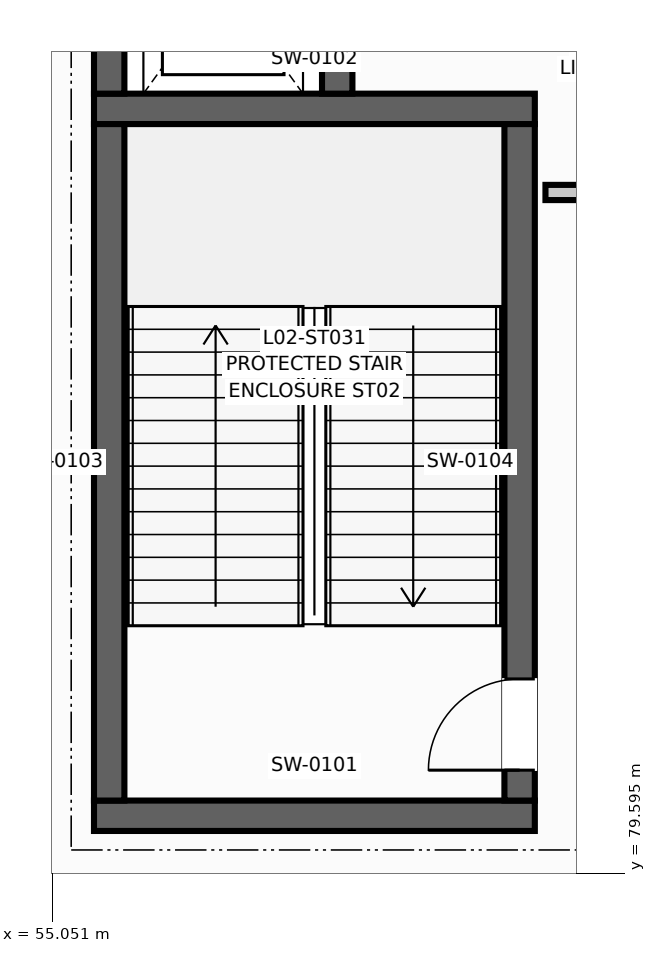
"""IFC4 building model, lengths in metres.
Left out: names, types, materials, properties, quantities, classifications, styles, units other than length and angle.
Written with IfcOpenShell. Run it as: python <this file> out.ifc"""

import sys

from ifc_helpers import new_model, si_unit, direction, frame, frame_2d, origin, place, context, subcontext, project, spatial, rectangle, extrude, element, fill, save


model = new_model("IFC4")
c1 = context("Model", 3, precision=1e-05, world=origin(), true_north=direction((0.0, 1.0)))
c2 = subcontext(c1, "Body", "Model", "MODEL_VIEW")
j1 = project(units=[si_unit("LENGTHUNIT", "METRE"), si_unit("PLANEANGLEUNIT", "RADIAN")], contexts=[c1])
p1 = place(None, origin())
s1 = spatial("IfcSite", under=j1, at=p1, CompositionType="ELEMENT")
p2 = place(p1, origin())
s2 = spatial("IfcBuilding", under=s1, at=p2, CompositionType="ELEMENT")
p3 = place(p2, frame((0.0, 0.0, 9.0)))
s3 = spatial("IfcBuildingStorey", under=s2, at=p3, CompositionType="ELEMENT", Elevation=9.0)
for number, where, z_axis, x_axis in (
    (1, (55.6, 80.35, 0.0), (0.0, 0.0, 1.0), (1.0, 0.0, 0.0)),
    (2, (55.6, 89.65, 0.0), (0.0, 0.0, 1.0), (1.0, 0.0, 0.0)),
):
    element("IfcWall", number, at=place(p3, frame(where, z_axis=z_axis, x_axis=x_axis)), inside=s3, PredefinedType="SHEAR", context=c2, shape_type="SweptSolid", body=[
        extrude(rectangle(XDim=5.8, YDim=0.4, at=frame_2d((2.9, 0.0))), origin(), (0.0, 0.0, 1.0), 4.25),
    ])
p4 = place(p3, frame((55.8, 80.55, 0.0), z_axis=(0.0, 0.0, 1.0), x_axis=(0.0, 1.0, 0.0)))
e3 = element("IfcWall", 3, at=p4, inside=s3, PredefinedType="SHEAR", context=c2, shape_type="SweptSolid", body=[
    extrude(rectangle(XDim=8.9, YDim=0.4, at=frame_2d((4.45, 0.0))), origin(), (0.0, 0.0, 1.0), 4.25),
])
p5 = place(p3, frame((61.2, 80.55, 0.0), z_axis=(0.0, 0.0, 1.0), x_axis=(0.0, 1.0, 0.0)))
e4 = element("IfcWall", 4, at=p5, inside=s3, PredefinedType="SHEAR", context=c2, shape_type="SweptSolid", body=[
    extrude(rectangle(XDim=8.9, YDim=0.4, at=frame_2d((4.45, 0.0))), origin(), (0.0, 0.0, 1.0), 4.25),
])
p6 = place(p5, frame((0.4, 0.0, 0.0)))
e5 = element("IfcOpeningElement", 5, at=p6, cuts=e4, PredefinedType="OPENING", context=c2, shape_type="SweptSolid", body=[
    extrude(rectangle(XDim=1.2, YDim=2.2, at=frame_2d((0.6, 1.1))), frame((0.0, 0.21, 0.0), z_axis=(0.0, -1.0, 0.0), x_axis=(1.0, 0.0, 0.0)), (0.0, 0.0, 1.0), 0.42),
])
p7 = place(p3, frame((55.8, 89.85, 0.0), z_axis=(0.0, 0.0, 1.0), x_axis=(0.0, 1.0, 0.0)))
e6 = element("IfcWall", 6, at=p7, inside=s3, PredefinedType="SHEAR", context=c2, shape_type="SweptSolid", body=[
    extrude(rectangle(XDim=2.9, YDim=0.4, at=frame_2d((1.45, 0.0))), origin(), (0.0, 0.0, 1.0), 4.25),
])
p8 = place(p3, frame((58.8, 89.85, 0.0), z_axis=(0.0, 0.0, 1.0), x_axis=(0.0, 1.0, 0.0)))
e7 = element("IfcWall", 7, at=p8, inside=s3, PredefinedType="SHEAR", context=c2, shape_type="SweptSolid", body=[
    extrude(rectangle(XDim=2.9, YDim=0.4, at=frame_2d((1.45, 0.0))), origin(), (0.0, 0.0, 1.0), 4.25),
])
p9 = place(p8, frame((0.9, 0.0, 0.0)))
e8 = element("IfcOpeningElement", 8, at=p9, cuts=e7, PredefinedType="OPENING", context=c2, shape_type="SweptSolid", body=[
    extrude(rectangle(XDim=1.1, YDim=2.2, at=frame_2d((0.55, 1.1))), frame((0.0, 0.21, 0.0), z_axis=(0.0, -1.0, 0.0), x_axis=(1.0, 0.0, 0.0)), (0.0, 0.0, 1.0), 0.42),
])
p10 = place(p3, frame((61.54, 88.55, 0.0), z_axis=(0.0, 0.0, 1.0), x_axis=(1.0, 0.0, 0.0)))
e9 = element("IfcWall", 9, at=p10, inside=s3, PredefinedType="PARTITIONING", context=c2, shape_type="SweptSolid", body=[
    extrude(rectangle(XDim=4.18, YDim=0.2, at=frame_2d((2.09, 0.0))), origin(), (0.0, 0.0, 1.0), 3.22),
])
p11 = place(p6, origin())
e10 = element("IfcDoor", 10, at=p11, inside=s3, OperationType="SINGLE_SWING_LEFT", PredefinedType="DOOR", context=c2, shape_type="SweptSolid", body=[
    extrude(rectangle(XDim=1.2, YDim=2.2, at=frame_2d((0.6, 1.1))), frame((0.0, 0.025, 0.0), z_axis=(0.0, -1.0, 0.0), x_axis=(1.0, 0.0, 0.0)), (0.0, 0.0, 1.0), 0.05),
])
fill(e5, e10)
save(model, sys.argv[1])
